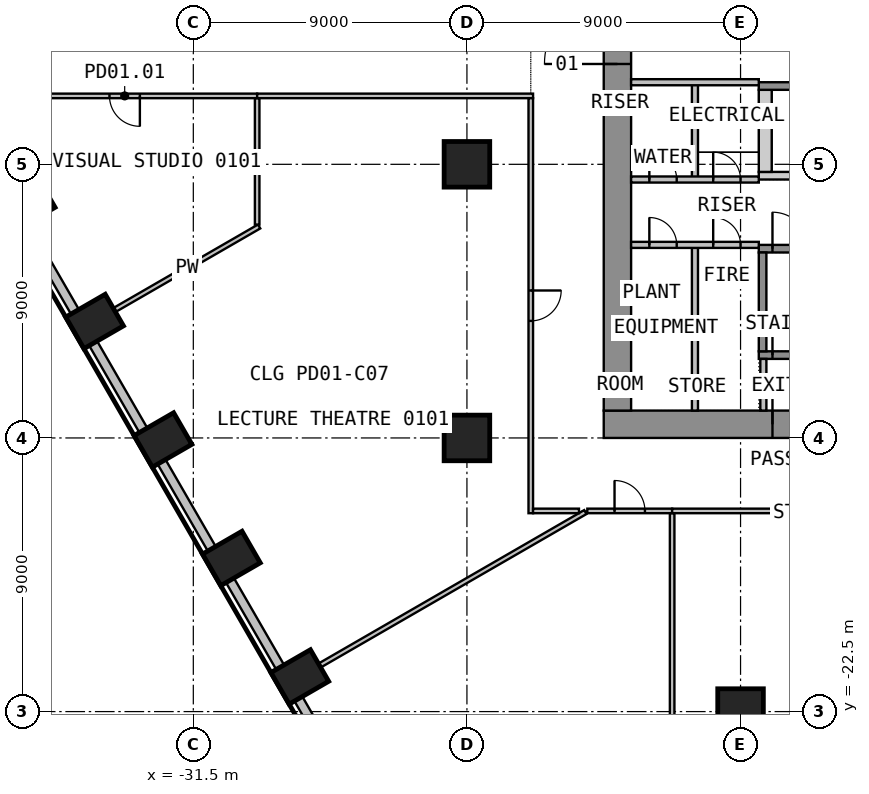
"""IFC4 building model, lengths in metres.
Left out: names, types, materials, properties, quantities, classifications, styles, units other than length and angle.
Written with IfcOpenShell. Run it as: python <this file> out.ifc"""

import sys

from ifc_helpers import new_model, si_unit, direction, frame, frame_2d, origin, origin_2d, place, context, subcontext, project, spatial, polyline, rectangle, circle, outline, extrude, element, fill, save


model = new_model("IFC4")
c1 = context("Model", 3, precision=1e-05, world=origin(), true_north=direction((0.0, 1.0)))
c2 = subcontext(c1, "Body", "Model", "MODEL_VIEW")
j1 = project(units=[si_unit("LENGTHUNIT", "METRE"), si_unit("PLANEANGLEUNIT", "RADIAN")], contexts=[c1])
p1 = place(None, origin())
s1 = spatial("IfcSite", under=j1, at=p1, CompositionType="ELEMENT")
p2 = place(p1, origin())
s2 = spatial("IfcBuilding", under=s1, at=p2, CompositionType="ELEMENT")
p3 = place(p2, frame((0.0, 0.0, 6.0)))
s3 = spatial("IfcBuildingStorey", under=s2, at=p3, CompositionType="ELEMENT", Elevation=6.0)
for number, where, z_axis, x_axis in (
    (1, (-36.998, -5.772, 0.0), (0.0, 0.0, 1.0), (0.5, -0.866, 0.0)),
    (2, (-34.748, -9.669, 0.0), (0.0, 0.0, 1.0), (0.5, -0.866, 0.0)),
    (3, (-32.498, -13.566, 0.0), (0.0, 0.0, 1.0), (0.5, -0.866, 0.0)),
    (4, (-30.248, -17.463, 0.0), (0.0, 0.0, 1.0), (0.5, -0.866, 0.0)),
    (5, (-27.998, -21.361, 0.0), (0.0, 0.0, 1.0), (0.5, -0.866, 0.0)),
):
    element("IfcColumn", number, at=place(p3, frame(where, z_axis=z_axis, x_axis=x_axis)), inside=s3, PredefinedType="COLUMN", context=c2, shape_type="SweptSolid", body=[
        extrude(rectangle(XDim=1.2, YDim=1.5, at=origin_2d()), origin(), (0.0, 0.0, 1.0), 4.4),
    ])
for number, where, z_axis, x_axis in (
    (6, (-22.5, -13.5, 0.0), (0.0, 0.0, 1.0), (1.0, 0.0, 0.0)),
    (7, (-22.5, -4.5, 0.0), (0.0, 0.0, 1.0), (1.0, 0.0, 0.0)),
    (8, (-13.5, -22.5, 0.0), (0.0, 0.0, 1.0), (1.0, 0.0, 0.0)),
):
    element("IfcColumn", number, at=place(p3, frame(where, z_axis=z_axis, x_axis=x_axis)), inside=s3, PredefinedType="COLUMN", context=c2, shape_type="SweptSolid", body=[
        extrude(circle(Radius=0.75, at=origin_2d()), origin(), (0.0, 0.0, 1.0), 4.4),
    ])
for number, where, z_axis, x_axis in (
    (9, (-37.044, -6.492, 0.0), (0.0, 0.0, 1.0), (0.5, -0.866, 0.0)),
    (10, (-34.794, -10.389, 0.0), (0.0, 0.0, 1.0), (0.5, -0.866, 0.0)),
    (11, (-32.544, -14.286, 0.0), (0.0, 0.0, 1.0), (0.5, -0.866, 0.0)),
    (12, (-30.294, -18.184, 0.0), (0.0, 0.0, 1.0), (0.5, -0.866, 0.0)),
    (13, (-28.044, -22.081, 0.0), (0.0, 0.0, 1.0), (0.5, -0.866, 0.0)),
):
    element("IfcWall", number, at=place(p3, frame(where, z_axis=z_axis, x_axis=x_axis)), inside=s3, PredefinedType="SOLIDWALL", context=c2, shape_type="SweptSolid", body=[
        extrude(rectangle(XDim=3.299, YDim=0.3, at=frame_2d((1.649, 0.0))), origin(), (0.0, 0.0, 1.0), 4.4),
    ])
p4 = place(p3, frame((-18.0, -13.05, 0.0), z_axis=(0.0, 0.0, 1.0), x_axis=(1.0, 0.0, 0.0)))
e14 = element("IfcWall", 14, at=p4, inside=s3, PredefinedType="SHEAR", context=c2, shape_type="SweptSolid", body=[
    extrude(rectangle(XDim=36.0, YDim=0.9, at=frame_2d((18.0, 0.0))), origin(), (0.0, 0.0, 1.0), 4.4),
])
p5 = place(p4, frame((16.8, 0.0, 0.0)))
e15 = element("IfcOpeningElement", 15, at=p5, cuts=e14, PredefinedType="OPENING", context=c2, shape_type="SweptSolid", body=[
    extrude(rectangle(XDim=2.4, YDim=2.1, at=frame_2d((1.2, 1.05))), frame((0.0, 0.46, 0.0), z_axis=(0.0, -1.0, 0.0), x_axis=(1.0, 0.0, 0.0)), (0.0, 0.0, 1.0), 0.92),
])
p6 = place(p4, frame((5.55, 0.0, 0.0)))
e16 = element("IfcOpeningElement", 16, at=p6, cuts=e14, PredefinedType="OPENING", context=c2, shape_type="SweptSolid", body=[
    extrude(rectangle(XDim=1.2, YDim=2.1, at=frame_2d((0.6, 1.05))), frame((0.0, 0.46, 0.0), z_axis=(0.0, -1.0, 0.0), x_axis=(1.0, 0.0, 0.0)), (0.0, 0.0, 1.0), 0.92),
])
p7 = place(p4, frame((29.25, 0.0, 0.0)))
e17 = element("IfcOpeningElement", 17, at=p7, cuts=e14, PredefinedType="OPENING", context=c2, shape_type="SweptSolid", body=[
    extrude(rectangle(XDim=1.2, YDim=2.1, at=frame_2d((0.6, 1.05))), frame((0.0, 0.46, 0.0), z_axis=(0.0, -1.0, 0.0), x_axis=(1.0, 0.0, 0.0)), (0.0, 0.0, 1.0), 0.92),
])
p8 = place(p3, frame((-17.55, -12.6, 0.0), z_axis=(0.0, 0.0, 1.0), x_axis=(0.0, 1.0, 0.0)))
e18 = element("IfcWall", 18, at=p8, inside=s3, PredefinedType="SHEAR", context=c2, shape_type="SweptSolid", body=[
    extrude(rectangle(XDim=25.2, YDim=0.9, at=frame_2d((12.6, 0.0))), origin(), (0.0, 0.0, 1.0), 4.4),
])
p9 = place(p8, frame((11.4, 0.0, 0.0)))
e19 = element("IfcOpeningElement", 19, at=p9, cuts=e18, PredefinedType="OPENING", context=c2, shape_type="SweptSolid", body=[
    extrude(rectangle(XDim=2.4, YDim=2.1, at=frame_2d((1.2, 1.05))), frame((0.0, 0.46, 0.0), z_axis=(0.0, -1.0, 0.0), x_axis=(1.0, 0.0, 0.0)), (0.0, 0.0, 1.0), 0.92),
])
p10 = place(p3, origin())
e20 = element("IfcWall", 20, at=p10, inside=s3, PredefinedType="SHEAR", context=c2, shape_type="SweptSolid", body=[
    extrude(outline(polyline([(-12.9, -5.0), (12.9, -5.0), (12.9, -4.75), (-12.9, -4.75), (-12.9, -5.0)])), origin(), (0.0, 0.0, 1.0), 4.4),
])
p11 = place(p3, origin())
e21 = element("IfcWall", 21, at=p11, inside=s3, PredefinedType="SHEAR", context=c2, shape_type="SweptSolid", body=[
    extrude(outline(polyline([(-12.9, -4.75), (-12.475, -4.75), (-12.475, -2.05), (-12.9, -2.05), (-12.9, -4.75)])), origin(), (0.0, 0.0, 1.0), 4.4),
])
p12 = place(p3, frame((-12.9, -1.925, 0.0), z_axis=(0.0, 0.0, 1.0), x_axis=(1.0, 0.0, 0.0)))
e22 = element("IfcWall", 22, at=p12, inside=s3, PredefinedType="SHEAR", context=c2, shape_type="SweptSolid", body=[
    extrude(rectangle(XDim=25.8, YDim=0.25, at=frame_2d((12.9, 0.0))), origin(), (0.0, 0.0, 1.0), 4.4),
])
p13 = place(p12, frame((1.1, 0.0, 0.0)))
e23 = element("IfcOpeningElement", 23, at=p13, cuts=e22, PredefinedType="OPENING", context=c2, shape_type="SweptSolid", body=[
    extrude(rectangle(XDim=1.2, YDim=2.1, at=frame_2d((0.6, 1.05))), frame((0.0, 0.135, 0.0), z_axis=(0.0, -1.0, 0.0), x_axis=(1.0, 0.0, 0.0)), (0.0, 0.0, 1.0), 0.27),
])
p14 = place(p12, frame((3.9, 0.0, 0.0)))
e24 = element("IfcOpeningElement", 24, at=p14, cuts=e22, PredefinedType="OPENING", context=c2, shape_type="SweptSolid", body=[
    extrude(rectangle(XDim=1.2, YDim=2.1, at=frame_2d((0.6, 1.05))), frame((0.0, 0.135, 0.0), z_axis=(0.0, -1.0, 0.0), x_axis=(1.0, 0.0, 0.0)), (0.0, 0.0, 1.0), 0.27),
])
p15 = place(p12, frame((6.7, 0.0, 0.0)))
e25 = element("IfcOpeningElement", 25, at=p15, cuts=e22, PredefinedType="OPENING", context=c2, shape_type="SweptSolid", body=[
    extrude(rectangle(XDim=1.2, YDim=2.1, at=frame_2d((0.6, 1.05))), frame((0.0, 0.135, 0.0), z_axis=(0.0, -1.0, 0.0), x_axis=(1.0, 0.0, 0.0)), (0.0, 0.0, 1.0), 0.27),
])
p16 = place(p12, frame((9.5, 0.0, 0.0)))
e26 = element("IfcOpeningElement", 26, at=p16, cuts=e22, PredefinedType="OPENING", context=c2, shape_type="SweptSolid", body=[
    extrude(rectangle(XDim=1.2, YDim=2.1, at=frame_2d((0.6, 1.05))), frame((0.0, 0.135, 0.0), z_axis=(0.0, -1.0, 0.0), x_axis=(1.0, 0.0, 0.0)), (0.0, 0.0, 1.0), 0.27),
])
p17 = place(p12, frame((12.3, 0.0, 0.0)))
e27 = element("IfcOpeningElement", 27, at=p17, cuts=e22, PredefinedType="OPENING", context=c2, shape_type="SweptSolid", body=[
    extrude(rectangle(XDim=1.2, YDim=2.1, at=frame_2d((0.6, 1.05))), frame((0.0, 0.135, 0.0), z_axis=(0.0, -1.0, 0.0), x_axis=(1.0, 0.0, 0.0)), (0.0, 0.0, 1.0), 0.27),
])
p18 = place(p12, frame((15.1, 0.0, 0.0)))
e28 = element("IfcOpeningElement", 28, at=p18, cuts=e22, PredefinedType="OPENING", context=c2, shape_type="SweptSolid", body=[
    extrude(rectangle(XDim=1.2, YDim=2.1, at=frame_2d((0.6, 1.05))), frame((0.0, 0.135, 0.0), z_axis=(0.0, -1.0, 0.0), x_axis=(1.0, 0.0, 0.0)), (0.0, 0.0, 1.0), 0.27),
])
p19 = place(p3, frame((-12.9, -10.775, 0.0), z_axis=(0.0, 0.0, 1.0), x_axis=(1.0, 0.0, 0.0)))
e29 = element("IfcWall", 29, at=p19, inside=s3, PredefinedType="SHEAR", context=c2, shape_type="SweptSolid", body=[
    extrude(rectangle(XDim=10.1, YDim=0.25, at=frame_2d((5.05, 0.0))), origin(), (0.0, 0.0, 1.0), 4.4),
])
p20 = place(p19, frame((0.45, 0.0, 0.0)))
e30 = element("IfcOpeningElement", 30, at=p20, cuts=e29, PredefinedType="OPENING", context=c2, shape_type="SweptSolid", body=[
    extrude(rectangle(XDim=1.2, YDim=2.1, at=frame_2d((0.6, 1.05))), frame((0.0, 0.135, 0.0), z_axis=(0.0, -1.0, 0.0), x_axis=(1.0, 0.0, 0.0)), (0.0, 0.0, 1.0), 0.27),
])
p21 = place(p3, frame((-12.9, -7.275, 0.0), z_axis=(0.0, 0.0, 1.0), x_axis=(1.0, 0.0, 0.0)))
e31 = element("IfcWall", 31, at=p21, inside=s3, PredefinedType="SHEAR", context=c2, shape_type="SweptSolid", body=[
    extrude(rectangle(XDim=10.1, YDim=0.25, at=frame_2d((5.05, 0.0))), origin(), (0.0, 0.0, 1.0), 4.4),
])
p22 = place(p21, frame((0.45, 0.0, 0.0)))
e32 = element("IfcOpeningElement", 32, at=p22, cuts=e31, PredefinedType="OPENING", context=c2, shape_type="SweptSolid", body=[
    extrude(rectangle(XDim=1.2, YDim=2.1, at=frame_2d((0.6, 1.05))), frame((0.0, 0.135, 0.0), z_axis=(0.0, -1.0, 0.0), x_axis=(1.0, 0.0, 0.0)), (0.0, 0.0, 1.0), 0.27),
])
p23 = place(p3, frame((-12.775, -10.65, 0.0), z_axis=(0.0, 0.0, 1.0), x_axis=(0.0, 1.0, 0.0)))
e33 = element("IfcWall", 33, at=p23, inside=s3, PredefinedType="SHEAR", context=c2, shape_type="SweptSolid", body=[
    extrude(rectangle(XDim=3.25, YDim=0.25, at=frame_2d((1.625, 0.0))), origin(), (0.0, 0.0, 1.0), 4.4),
])
p24 = place(p3, frame((-12.75, -12.6, 0.0), z_axis=(0.0, 0.0, 1.0), x_axis=(0.0, 1.0, 0.0)))
e34 = element("IfcWall", 34, at=p24, inside=s3, PredefinedType="PARTITIONING", context=c2, shape_type="SweptSolid", body=[
    extrude(rectangle(XDim=1.7, YDim=0.2, at=frame_2d((0.85, 0.0))), origin(), (0.0, 0.0, 1.0), 4.4),
])
p25 = place(p3, frame((-15.0, -12.6, 0.0), z_axis=(0.0, 0.0, 1.0), x_axis=(0.0, 1.0, 0.0)))
e35 = element("IfcWall", 35, at=p25, inside=s3, PredefinedType="PARTITIONING", context=c2, shape_type="SweptSolid", body=[
    extrude(rectangle(XDim=5.45, YDim=0.2, at=frame_2d((2.725, 0.0))), origin(), (0.0, 0.0, 1.0), 4.4),
])
p26 = place(p3, frame((-17.1, -7.15, 0.0), z_axis=(0.0, 0.0, 1.0), x_axis=(1.0, 0.0, 0.0)))
e36 = element("IfcWall", 36, at=p26, inside=s3, PredefinedType="PARTITIONING", context=c2, shape_type="SweptSolid", body=[
    extrude(rectangle(XDim=4.2, YDim=0.2, at=frame_2d((2.1, 0.0))), origin(), (0.0, 0.0, 1.0), 4.4),
])
p27 = place(p26, frame((0.6, 0.0, 0.0)))
e37 = element("IfcOpeningElement", 37, at=p27, cuts=e36, PredefinedType="OPENING", context=c2, shape_type="SweptSolid", body=[
    extrude(rectangle(XDim=0.9, YDim=2.1, at=frame_2d((0.45, 1.05))), frame((0.0, 0.11, 0.0), z_axis=(0.0, -1.0, 0.0), x_axis=(1.0, 0.0, 0.0)), (0.0, 0.0, 1.0), 0.22),
])
p28 = place(p26, frame((2.7, 0.0, 0.0)))
e38 = element("IfcOpeningElement", 38, at=p28, cuts=e36, PredefinedType="OPENING", context=c2, shape_type="SweptSolid", body=[
    extrude(rectangle(XDim=0.9, YDim=2.1, at=frame_2d((0.45, 1.05))), frame((0.0, 0.11, 0.0), z_axis=(0.0, -1.0, 0.0), x_axis=(1.0, 0.0, 0.0)), (0.0, 0.0, 1.0), 0.22),
])
p29 = place(p3, frame((-15.0, -5.0, 0.0), z_axis=(0.0, 0.0, 1.0), x_axis=(0.0, 1.0, 0.0)))
e39 = element("IfcWall", 39, at=p29, inside=s3, PredefinedType="PARTITIONING", context=c2, shape_type="SweptSolid", body=[
    extrude(rectangle(XDim=3.2, YDim=0.2, at=frame_2d((1.6, 0.0))), origin(), (0.0, 0.0, 1.0), 4.4),
])
p30 = place(p3, frame((-17.1, -5.0, 0.0), z_axis=(0.0, 0.0, 1.0), x_axis=(1.0, 0.0, 0.0)))
e40 = element("IfcWall", 40, at=p30, inside=s3, PredefinedType="PARTITIONING", context=c2, shape_type="SweptSolid", body=[
    extrude(rectangle(XDim=4.2, YDim=0.2, at=frame_2d((2.1, 0.0))), origin(), (0.0, 0.0, 1.0), 4.4),
])
p31 = place(p30, frame((0.6, 0.0, 0.0)))
e41 = element("IfcOpeningElement", 41, at=p31, cuts=e40, PredefinedType="OPENING", context=c2, shape_type="SweptSolid", body=[
    extrude(rectangle(XDim=0.9, YDim=2.1, at=frame_2d((0.45, 1.05))), frame((0.0, 0.11, 0.0), z_axis=(0.0, -1.0, 0.0), x_axis=(1.0, 0.0, 0.0)), (0.0, 0.0, 1.0), 0.22),
])
p32 = place(p30, frame((2.7, 0.0, 0.0)))
e42 = element("IfcOpeningElement", 42, at=p32, cuts=e40, PredefinedType="OPENING", context=c2, shape_type="SweptSolid", body=[
    extrude(rectangle(XDim=0.9, YDim=2.1, at=frame_2d((0.45, 1.05))), frame((0.0, 0.11, 0.0), z_axis=(0.0, -1.0, 0.0), x_axis=(1.0, 0.0, 0.0)), (0.0, 0.0, 1.0), 0.22),
])
p33 = place(p3, frame((-17.1, -1.8, 0.0), z_axis=(0.0, 0.0, 1.0), x_axis=(1.0, 0.0, 0.0)))
e43 = element("IfcWall", 43, at=p33, inside=s3, PredefinedType="PARTITIONING", context=c2, shape_type="SweptSolid", body=[
    extrude(rectangle(XDim=4.2, YDim=0.2, at=frame_2d((2.1, 0.0))), origin(), (0.0, 0.0, 1.0), 4.4),
])
p34 = place(p3, frame((-29.4, -2.25, 0.0), z_axis=(0.0, 0.0, 1.0), x_axis=(-1.0, 0.0, 0.0)))
e44 = element("IfcWall", 44, at=p34, inside=s3, PredefinedType="PARTITIONING", context=c2, shape_type="SweptSolid", body=[
    extrude(rectangle(XDim=8.716, YDim=0.15, at=frame_2d((4.358, 0.0))), origin(), (0.0, 0.0, 1.0), 4.4),
])
p35 = place(p34, frame((3.858, 0.0, 0.0)))
e45 = element("IfcOpeningElement", 45, at=p35, cuts=e44, PredefinedType="OPENING", context=c2, shape_type="SweptSolid", body=[
    extrude(rectangle(XDim=1.0, YDim=2.1, at=frame_2d((0.5, 1.05))), frame((0.0, 0.085, 0.0), z_axis=(0.0, -1.0, 0.0), x_axis=(1.0, 0.0, 0.0)), (0.0, 0.0, 1.0), 0.17),
])
p36 = place(p3, frame((-29.335, -6.544, 0.0), z_axis=(0.0, 0.0, 1.0), x_axis=(-0.866046852978, -0.499962847066, 0.0)))
e46 = element("IfcWall", 46, at=p36, inside=s3, PredefinedType="PARTITIONING", context=c2, shape_type="SweptSolid", body=[
    extrude(rectangle(XDim=5.48, YDim=0.15, at=frame_2d((2.74, 0.0))), origin(), (0.0, 0.0, 1.0), 4.4),
])
p37 = place(p3, frame((-29.4, -2.325, 0.0), z_axis=(0.0, 0.0, 1.0), x_axis=(0.0, -1.0, 0.0)))
e47 = element("IfcWall", 47, at=p37, inside=s3, PredefinedType="PARTITIONING", context=c2, shape_type="SweptSolid", body=[
    extrude(rectangle(XDim=4.157, YDim=0.15, at=frame_2d((2.079, 0.0))), origin(), (0.0, 0.0, 1.0), 4.4),
])
p38 = place(p3, frame((-20.325, -2.25, 0.0), z_axis=(0.0, 0.0, 1.0), x_axis=(-1.0, 0.0, 0.0)))
e48 = element("IfcWall", 48, at=p38, inside=s3, PredefinedType="PARTITIONING", context=c2, shape_type="SweptSolid", body=[
    extrude(rectangle(XDim=9.075, YDim=0.15, at=frame_2d((4.538, 0.0))), origin(), (0.0, 0.0, 1.0), 4.4),
])
p39 = place(p3, frame((-18.605, -15.938, 0.0), z_axis=(0.0, 0.0, 1.0), x_axis=(-0.865988664976, -0.500063628085, 0.0)))
e49 = element("IfcWall", 49, at=p39, inside=s3, PredefinedType="PARTITIONING", context=c2, shape_type="SweptSolid", body=[
    extrude(rectangle(XDim=10.076, YDim=0.15, at=frame_2d((5.038, 0.0))), origin(), (0.0, 0.0, 1.0), 4.4),
])
p40 = place(p3, frame((-20.4, -2.325, 0.0), z_axis=(0.0, 0.0, 1.0), x_axis=(0.0, -1.0, 0.0)))
e50 = element("IfcWall", 50, at=p40, inside=s3, PredefinedType="PARTITIONING", context=c2, shape_type="SweptSolid", body=[
    extrude(rectangle(XDim=13.65, YDim=0.15, at=frame_2d((6.825, 0.0))), origin(), (0.0, 0.0, 1.0), 4.4),
])
p41 = place(p40, frame((6.325, 0.0, 0.0)))
e51 = element("IfcOpeningElement", 51, at=p41, cuts=e50, PredefinedType="OPENING", context=c2, shape_type="SweptSolid", body=[
    extrude(rectangle(XDim=1.0, YDim=2.1, at=frame_2d((0.5, 1.05))), frame((0.0, 0.085, 0.0), z_axis=(0.0, -1.0, 0.0), x_axis=(1.0, 0.0, 0.0)), (0.0, 0.0, 1.0), 0.17),
])
p42 = place(p3, frame((-20.325, -15.9, 0.0), z_axis=(0.0, 0.0, 1.0), x_axis=(1.0, 0.0, 0.0)))
e52 = element("IfcWall", 52, at=p42, inside=s3, PredefinedType="PARTITIONING", context=c2, shape_type="SweptSolid", body=[
    extrude(rectangle(XDim=1.51, YDim=0.15, at=frame_2d((0.755, 0.0))), origin(), (0.0, 0.0, 1.0), 4.4),
])
p43 = place(p3, frame((-18.54, -15.9, 0.0), z_axis=(0.0, 0.0, 1.0), x_axis=(1.0, 0.0, 0.0)))
e53 = element("IfcWall", 53, at=p43, inside=s3, PredefinedType="PARTITIONING", context=c2, shape_type="SweptSolid", body=[
    extrude(rectangle(XDim=2.79, YDim=0.15, at=frame_2d((1.395, 0.0))), origin(), (0.0, 0.0, 1.0), 4.4),
])
p44 = place(p43, frame((0.895, 0.0, 0.0)))
e54 = element("IfcOpeningElement", 54, at=p44, cuts=e53, PredefinedType="OPENING", context=c2, shape_type="SweptSolid", body=[
    extrude(rectangle(XDim=1.0, YDim=2.1, at=frame_2d((0.5, 1.05))), frame((0.0, 0.085, 0.0), z_axis=(0.0, -1.0, 0.0), x_axis=(1.0, 0.0, 0.0)), (0.0, 0.0, 1.0), 0.17),
])
p45 = place(p3, frame((-15.75, -15.975, 0.0), z_axis=(0.0, 0.0, 1.0), x_axis=(0.0, -1.0, 0.0)))
e55 = element("IfcWall", 55, at=p45, inside=s3, PredefinedType="PARTITIONING", context=c2, shape_type="SweptSolid", body=[
    extrude(rectangle(XDim=14.285, YDim=0.15, at=frame_2d((7.142, 0.0))), origin(), (0.0, 0.0, 1.0), 4.4),
])
p46 = place(p3, frame((-15.75, -15.9, 0.0), z_axis=(0.0, 0.0, 1.0), x_axis=(1.0, 0.0, 0.0)))
e56 = element("IfcWall", 56, at=p46, inside=s3, PredefinedType="PARTITIONING", context=c2, shape_type="SweptSolid", body=[
    extrude(rectangle(XDim=13.575, YDim=0.15, at=frame_2d((6.788, 0.0))), origin(), (0.0, 0.0, 1.0), 4.4),
])
p47 = place(p9, origin())
e57 = element("IfcDoor", 57, at=p47, inside=s3, OperationType="DOUBLE_DOOR_DOUBLE_SWING", PredefinedType="DOOR", context=c2, shape_type="SweptSolid", body=[
    extrude(rectangle(XDim=2.4, YDim=2.1, at=frame_2d((1.2, 1.05))), frame((0.0, 0.025, 0.0), z_axis=(0.0, -1.0, 0.0), x_axis=(1.0, 0.0, 0.0)), (0.0, 0.0, 1.0), 0.05),
])
fill(e19, e57)
p48 = place(p6, origin())
e58 = element("IfcDoor", 58, at=p48, inside=s3, OperationType="SINGLE_SWING_RIGHT", PredefinedType="DOOR", context=c2, shape_type="SweptSolid", body=[
    extrude(rectangle(XDim=1.2, YDim=2.1, at=frame_2d((0.6, 1.05))), frame((0.0, 0.025, 0.0), z_axis=(0.0, -1.0, 0.0), x_axis=(1.0, 0.0, 0.0)), (0.0, 0.0, 1.0), 0.05),
])
fill(e16, e58)
p49 = place(p22, origin())
e59 = element("IfcDoor", 59, at=p49, inside=s3, OperationType="SINGLE_SWING_LEFT", PredefinedType="DOOR", context=c2, shape_type="SweptSolid", body=[
    extrude(rectangle(XDim=1.2, YDim=2.1, at=frame_2d((0.6, 1.05))), frame((0.0, 0.025, 0.0), z_axis=(0.0, -1.0, 0.0), x_axis=(1.0, 0.0, 0.0)), (0.0, 0.0, 1.0), 0.05),
])
fill(e32, e59)
p50 = place(p20, origin())
e60 = element("IfcDoor", 60, at=p50, inside=s3, OperationType="SINGLE_SWING_RIGHT", PredefinedType="DOOR", context=c2, shape_type="SweptSolid", body=[
    extrude(rectangle(XDim=1.2, YDim=2.1, at=frame_2d((0.6, 1.05))), frame((0.0, 0.025, 0.0), z_axis=(0.0, -1.0, 0.0), x_axis=(1.0, 0.0, 0.0)), (0.0, 0.0, 1.0), 0.05),
])
fill(e30, e60)
p51 = place(p27, origin())
e61 = element("IfcDoor", 61, at=p51, inside=s3, OperationType="SINGLE_SWING_LEFT", PredefinedType="DOOR", context=c2, shape_type="SweptSolid", body=[
    extrude(rectangle(XDim=0.9, YDim=2.1, at=frame_2d((0.45, 1.05))), frame((0.0, 0.025, 0.0), z_axis=(0.0, -1.0, 0.0), x_axis=(1.0, 0.0, 0.0)), (0.0, 0.0, 1.0), 0.05),
])
fill(e37, e61)
p52 = place(p28, origin())
e62 = element("IfcDoor", 62, at=p52, inside=s3, OperationType="SINGLE_SWING_LEFT", PredefinedType="DOOR", context=c2, shape_type="SweptSolid", body=[
    extrude(rectangle(XDim=0.9, YDim=2.1, at=frame_2d((0.45, 1.05))), frame((0.0, 0.025, 0.0), z_axis=(0.0, -1.0, 0.0), x_axis=(1.0, 0.0, 0.0)), (0.0, 0.0, 1.0), 0.05),
])
fill(e38, e62)
p53 = place(p31, origin())
e63 = element("IfcDoor", 63, at=p53, inside=s3, OperationType="SINGLE_SWING_LEFT", PredefinedType="DOOR", context=c2, shape_type="SweptSolid", body=[
    extrude(rectangle(XDim=0.9, YDim=2.1, at=frame_2d((0.45, 1.05))), frame((0.0, 0.025, 0.0), z_axis=(0.0, -1.0, 0.0), x_axis=(1.0, 0.0, 0.0)), (0.0, 0.0, 1.0), 0.05),
])
fill(e41, e63)
p54 = place(p32, origin())
e64 = element("IfcDoor", 64, at=p54, inside=s3, OperationType="SINGLE_SWING_LEFT", PredefinedType="DOOR", context=c2, shape_type="SweptSolid", body=[
    extrude(rectangle(XDim=0.9, YDim=2.1, at=frame_2d((0.45, 1.05))), frame((0.0, 0.025, 0.0), z_axis=(0.0, -1.0, 0.0), x_axis=(1.0, 0.0, 0.0)), (0.0, 0.0, 1.0), 0.05),
])
fill(e42, e64)
p55 = place(p35, origin())
e65 = element("IfcDoor", 65, at=p55, inside=s3, OperationType="SINGLE_SWING_RIGHT", PredefinedType="DOOR", context=c2, shape_type="SweptSolid", body=[
    extrude(rectangle(XDim=1.0, YDim=2.1, at=frame_2d((0.5, 1.05))), frame((0.0, 0.025, 0.0), z_axis=(0.0, -1.0, 0.0), x_axis=(1.0, 0.0, 0.0)), (0.0, 0.0, 1.0), 0.05),
])
fill(e45, e65)
p56 = place(p41, origin())
e66 = element("IfcDoor", 66, at=p56, inside=s3, OperationType="SINGLE_SWING_LEFT", PredefinedType="DOOR", context=c2, shape_type="SweptSolid", body=[
    extrude(rectangle(XDim=1.0, YDim=2.1, at=frame_2d((0.5, 1.05))), frame((0.0, 0.025, 0.0), z_axis=(0.0, -1.0, 0.0), x_axis=(1.0, 0.0, 0.0)), (0.0, 0.0, 1.0), 0.05),
])
fill(e51, e66)
p57 = place(p44, origin())
e67 = element("IfcDoor", 67, at=p57, inside=s3, OperationType="SINGLE_SWING_LEFT", PredefinedType="DOOR", context=c2, shape_type="SweptSolid", body=[
    extrude(rectangle(XDim=1.0, YDim=2.1, at=frame_2d((0.5, 1.05))), frame((0.0, 0.025, 0.0), z_axis=(0.0, -1.0, 0.0), x_axis=(1.0, 0.0, 0.0)), (0.0, 0.0, 1.0), 0.05),
])
fill(e54, e67)
save(model, sys.argv[1])
